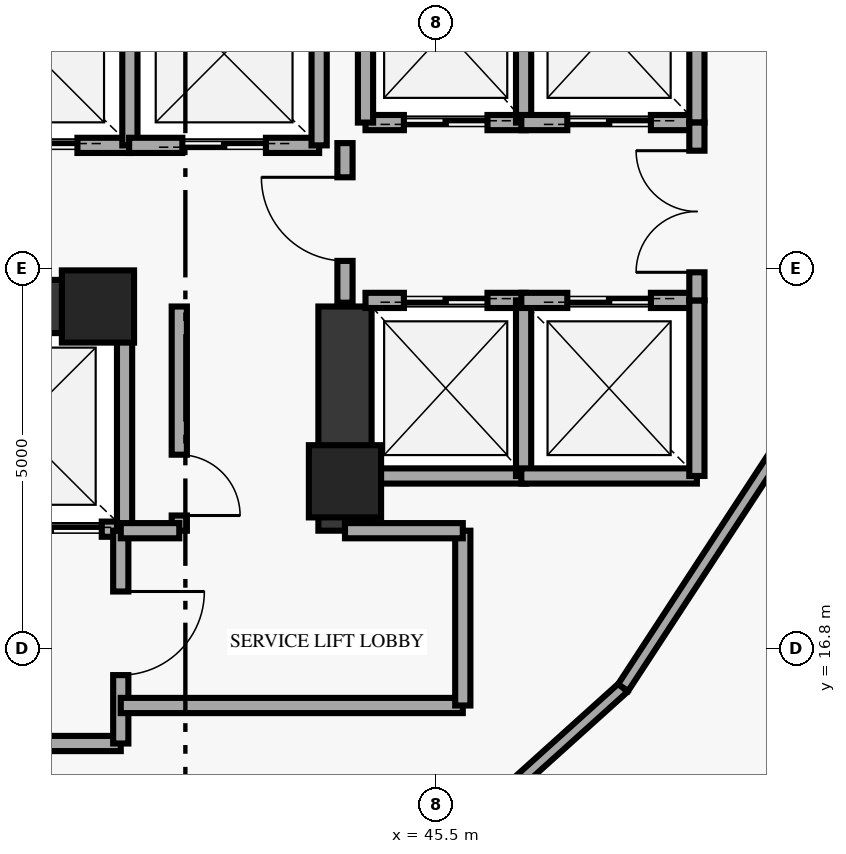
"""IFC4 building model, lengths in metres.
Left out: names, types, materials, properties, quantities, classifications, styles, units other than length and angle.
Written with IfcOpenShell. Run it as: python <this file> out.ifc"""

import sys

from ifc_helpers import new_model, si_unit, direction, frame, frame_2d, origin, origin_2d, place, context, subcontext, project, spatial, rectangle, extrude, element, fill, save


model = new_model("IFC4")
c1 = context("Model", 3, precision=1e-05, world=origin(), true_north=direction((0.0, 1.0)))
c2 = subcontext(c1, "Body", "Model", "MODEL_VIEW")
j1 = project(units=[si_unit("LENGTHUNIT", "METRE"), si_unit("PLANEANGLEUNIT", "RADIAN")], contexts=[c1])
p1 = place(None, origin())
s1 = spatial("IfcSite", under=j1, at=p1, CompositionType="ELEMENT")
p2 = place(p1, origin())
s2 = spatial("IfcBuilding", under=s1, at=p2, CompositionType="ELEMENT")
p3 = place(p2, frame((0.0, 0.0, 113.25)))
s3 = spatial("IfcBuildingStorey", under=s2, at=p3, CompositionType="ELEMENT", Elevation=113.25)
for number, where, z_axis, x_axis in (
    (1, (41.05, 21.3, 0.0), (0.0, 0.0, 1.0), (1.0, 0.0, 0.0)),
    (2, (44.3, 19.0, 0.0), (0.0, 0.0, 1.0), (1.0, 0.0, 0.0)),
):
    element("IfcColumn", number, at=place(p3, frame(where, z_axis=z_axis, x_axis=x_axis)), inside=s3, PredefinedType="PILASTER", context=c2, shape_type="SweptSolid", body=[
        extrude(rectangle(XDim=0.95, YDim=0.95, at=origin_2d()), origin(), (0.0, 0.0, 1.0), 4.75),
    ])
p4 = place(p3, frame((44.3, 18.35, 0.0), z_axis=(0.0, 0.0, 1.0), x_axis=(0.0, 1.0, 0.0)))
e3 = element("IfcWall", 3, at=p4, inside=s3, PredefinedType="SHEAR", context=c2, shape_type="SweptSolid", body=[
    extrude(rectangle(XDim=2.95, YDim=0.7, at=frame_2d((1.475, 0.0))), origin(), (0.0, 0.0, 1.0), 4.75),
])
p5 = place(p3, frame((33.7, 21.3, 0.0), z_axis=(0.0, 0.0, 1.0), x_axis=(1.0, 0.0, 0.0)))
e4 = element("IfcWall", 4, at=p5, inside=s3, PredefinedType="SHEAR", context=c2, shape_type="SweptSolid", body=[
    extrude(rectangle(XDim=7.55, YDim=0.7, at=frame_2d((3.775, 0.0))), origin(), (0.0, 0.0, 1.0), 4.75),
])
p6 = place(p3, frame((44.57, 23.72, 0.0), z_axis=(0.0, 0.0, 1.0), x_axis=(1.0, 0.0, 0.0)))
e5 = element("IfcWall", 5, at=p6, inside=s3, PredefinedType="SOLIDWALL", context=c2, shape_type="SweptSolid", body=[
    extrude(rectangle(XDim=2.11, YDim=0.2, at=frame_2d((1.055, 0.0))), origin(), (0.0, 0.0, 1.0), 4.75),
])
p7 = place(p6, frame((0.505, 0.0, 0.0)))
e6 = element("IfcOpeningElement", 6, at=p7, cuts=e5, PredefinedType="OPENING", context=c2, shape_type="SweptSolid", body=[
    extrude(rectangle(XDim=1.1, YDim=2.15, at=frame_2d((0.55, 1.075))), frame((0.0, 0.11, 0.0), z_axis=(0.0, -1.0, 0.0), x_axis=(1.0, 0.0, 0.0)), (0.0, 0.0, 1.0), 0.22),
])
for number, where, z_axis, x_axis in (
    (7, (44.57, 23.72, 0.0), (0.0, 0.0, 1.0), (0.0, 1.0, 0.0)),
    (8, (46.65, 23.72, 0.0), (0.0, 0.0, 1.0), (0.0, 1.0, 0.0)),
):
    element("IfcWall", number, at=place(p3, frame(where, z_axis=z_axis, x_axis=x_axis)), inside=s3, PredefinedType="SOLIDWALL", context=c2, shape_type="SweptSolid", body=[
        extrude(rectangle(XDim=2.41, YDim=0.2, at=frame_2d((1.205, 0.0))), origin(), (0.0, 0.0, 1.0), 4.75),
    ])
p8 = place(p3, frame((46.62, 23.72, 0.0), z_axis=(0.0, 0.0, 1.0), x_axis=(1.0, 0.0, 0.0)))
e9 = element("IfcWall", 9, at=p8, inside=s3, PredefinedType="SOLIDWALL", context=c2, shape_type="SweptSolid", body=[
    extrude(rectangle(XDim=2.31, YDim=0.2, at=frame_2d((1.155, 0.0))), origin(), (0.0, 0.0, 1.0), 4.75),
])
p9 = place(p8, frame((0.605, 0.0, 0.0)))
e10 = element("IfcOpeningElement", 10, at=p9, cuts=e9, PredefinedType="OPENING", context=c2, shape_type="SweptSolid", body=[
    extrude(rectangle(XDim=1.1, YDim=2.15, at=frame_2d((0.55, 1.075))), frame((0.0, 0.11, 0.0), z_axis=(0.0, -1.0, 0.0), x_axis=(1.0, 0.0, 0.0)), (0.0, 0.0, 1.0), 0.22),
])
p10 = place(p3, frame((48.93, 23.72, 0.0), z_axis=(0.0, 0.0, 1.0), x_axis=(0.0, 1.0, 0.0)))
e11 = element("IfcWall", 11, at=p10, inside=s3, PredefinedType="SOLIDWALL", context=c2, shape_type="SweptSolid", body=[
    extrude(rectangle(XDim=2.41, YDim=0.2, at=frame_2d((1.205, 0.0))), origin(), (0.0, 0.0, 1.0), 4.75),
])
p11 = place(p3, frame((44.57, 19.07, 0.0), z_axis=(0.0, 0.0, 1.0), x_axis=(1.0, 0.0, 0.0)))
e12 = element("IfcWall", 12, at=p11, inside=s3, PredefinedType="SOLIDWALL", context=c2, shape_type="SweptSolid", body=[
    extrude(rectangle(XDim=2.11, YDim=0.2, at=frame_2d((1.055, 0.0))), origin(), (0.0, 0.0, 1.0), 4.75),
])
p12 = place(p3, frame((44.57, 21.38, 0.0), z_axis=(0.0, 0.0, 1.0), x_axis=(1.0, 0.0, 0.0)))
e13 = element("IfcWall", 13, at=p12, inside=s3, PredefinedType="SOLIDWALL", context=c2, shape_type="SweptSolid", body=[
    extrude(rectangle(XDim=2.11, YDim=0.2, at=frame_2d((1.055, 0.0))), origin(), (0.0, 0.0, 1.0), 4.75),
])
p13 = place(p12, frame((0.505, 0.0, 0.0)))
e14 = element("IfcOpeningElement", 14, at=p13, cuts=e13, PredefinedType="OPENING", context=c2, shape_type="SweptSolid", body=[
    extrude(rectangle(XDim=1.1, YDim=2.15, at=frame_2d((0.55, 1.075))), frame((0.0, 0.11, 0.0), z_axis=(0.0, -1.0, 0.0), x_axis=(1.0, 0.0, 0.0)), (0.0, 0.0, 1.0), 0.22),
])
for number, where, z_axis, x_axis in (
    (15, (46.65, 19.07, 0.0), (0.0, 0.0, 1.0), (0.0, 1.0, 0.0)),
    (16, (46.62, 19.07, 0.0), (0.0, 0.0, 1.0), (1.0, 0.0, 0.0)),
):
    element("IfcWall", number, at=place(p3, frame(where, z_axis=z_axis, x_axis=x_axis)), inside=s3, PredefinedType="SOLIDWALL", context=c2, shape_type="SweptSolid", body=[
        extrude(rectangle(XDim=2.31, YDim=0.2, at=frame_2d((1.155, 0.0))), origin(), (0.0, 0.0, 1.0), 4.75),
    ])
p14 = place(p3, frame((46.62, 21.38, 0.0), z_axis=(0.0, 0.0, 1.0), x_axis=(1.0, 0.0, 0.0)))
e17 = element("IfcWall", 17, at=p14, inside=s3, PredefinedType="SOLIDWALL", context=c2, shape_type="SweptSolid", body=[
    extrude(rectangle(XDim=2.31, YDim=0.2, at=frame_2d((1.155, 0.0))), origin(), (0.0, 0.0, 1.0), 4.75),
])
p15 = place(p14, frame((0.605, 0.0, 0.0)))
e18 = element("IfcOpeningElement", 18, at=p15, cuts=e17, PredefinedType="OPENING", context=c2, shape_type="SweptSolid", body=[
    extrude(rectangle(XDim=1.1, YDim=2.15, at=frame_2d((0.55, 1.075))), frame((0.0, 0.11, 0.0), z_axis=(0.0, -1.0, 0.0), x_axis=(1.0, 0.0, 0.0)), (0.0, 0.0, 1.0), 0.22),
])
p16 = place(p3, frame((48.93, 19.07, 0.0), z_axis=(0.0, 0.0, 1.0), x_axis=(0.0, 1.0, 0.0)))
e19 = element("IfcWall", 19, at=p16, inside=s3, PredefinedType="SOLIDWALL", context=c2, shape_type="SweptSolid", body=[
    extrude(rectangle(XDim=2.31, YDim=0.2, at=frame_2d((1.155, 0.0))), origin(), (0.0, 0.0, 1.0), 4.75),
])
p17 = place(p3, frame((38.98, 23.42, 0.0), z_axis=(0.0, 0.0, 1.0), x_axis=(1.0, 0.0, 0.0)))
e20 = element("IfcWall", 20, at=p17, inside=s3, PredefinedType="SOLIDWALL", context=c2, shape_type="SweptSolid", body=[
    extrude(rectangle(XDim=2.5, YDim=0.2, at=frame_2d((1.25, 0.0))), origin(), (0.0, 0.0, 1.0), 4.75),
])
p18 = place(p17, frame((0.7, 0.0, 0.0)))
e21 = element("IfcOpeningElement", 21, at=p18, cuts=e20, PredefinedType="OPENING", context=c2, shape_type="SweptSolid", body=[
    extrude(rectangle(XDim=1.1, YDim=2.15, at=frame_2d((0.55, 1.075))), frame((0.0, 0.11, 0.0), z_axis=(0.0, -1.0, 0.0), x_axis=(1.0, 0.0, 0.0)), (0.0, 0.0, 1.0), 0.22),
])
p19 = place(p3, frame((41.47, 23.42, 0.0), z_axis=(0.0, 0.0, 1.0), x_axis=(0.0, 1.0, 0.0)))
e22 = element("IfcWall", 22, at=p19, inside=s3, PredefinedType="SOLIDWALL", context=c2, shape_type="SweptSolid", body=[
    extrude(rectangle(XDim=2.41, YDim=0.2, at=frame_2d((1.205, 0.0))), origin(), (0.0, 0.0, 1.0), 4.75),
])
p20 = place(p3, frame((41.46, 23.42, 0.0), z_axis=(0.0, 0.0, 1.0), x_axis=(1.0, 0.0, 0.0)))
e23 = element("IfcWall", 23, at=p20, inside=s3, PredefinedType="SOLIDWALL", context=c2, shape_type="SweptSolid", body=[
    extrude(rectangle(XDim=2.5, YDim=0.2, at=frame_2d((1.25, 0.0))), origin(), (0.0, 0.0, 1.0), 4.75),
])
p21 = place(p20, frame((0.7, 0.0, 0.0)))
e24 = element("IfcOpeningElement", 24, at=p21, cuts=e23, PredefinedType="OPENING", context=c2, shape_type="SweptSolid", body=[
    extrude(rectangle(XDim=1.1, YDim=2.15, at=frame_2d((0.55, 1.075))), frame((0.0, 0.11, 0.0), z_axis=(0.0, -1.0, 0.0), x_axis=(1.0, 0.0, 0.0)), (0.0, 0.0, 1.0), 0.22),
])
p22 = place(p3, frame((43.96, 23.42, 0.0), z_axis=(0.0, 0.0, 1.0), x_axis=(0.0, 1.0, 0.0)))
e25 = element("IfcWall", 25, at=p22, inside=s3, PredefinedType="SOLIDWALL", context=c2, shape_type="SweptSolid", body=[
    extrude(rectangle(XDim=2.41, YDim=0.2, at=frame_2d((1.205, 0.0))), origin(), (0.0, 0.0, 1.0), 4.75),
])
p23 = place(p3, frame((38.57, 18.37, 0.0), z_axis=(0.0, 0.0, 1.0), x_axis=(1.0, 0.0, 0.0)))
e26 = element("IfcWall", 26, at=p23, inside=s3, PredefinedType="SOLIDWALL", context=c2, shape_type="SweptSolid", body=[
    extrude(rectangle(XDim=2.83, YDim=0.2, at=frame_2d((1.415, 0.0))), origin(), (0.0, 0.0, 1.0), 4.75),
])
p24 = place(p23, frame((1.18, 0.0, 0.0)))
e27 = element("IfcOpeningElement", 27, at=p24, cuts=e26, PredefinedType="OPENING", context=c2, shape_type="SweptSolid", body=[
    extrude(rectangle(XDim=1.35, YDim=2.18, at=frame_2d((0.675, 1.09))), frame((0.0, 0.11, 0.0), z_axis=(0.0, -1.0, 0.0), x_axis=(1.0, 0.0, 0.0)), (0.0, 0.0, 1.0), 0.22),
])
p25 = place(p3, frame((41.4, 18.37, 0.0), z_axis=(0.0, 0.0, 1.0), x_axis=(0.0, 1.0, 0.0)))
e28 = element("IfcWall", 28, at=p25, inside=s3, PredefinedType="SOLIDWALL", context=c2, shape_type="SweptSolid", body=[
    extrude(rectangle(XDim=2.71, YDim=0.2, at=frame_2d((1.355, 0.0))), origin(), (0.0, 0.0, 1.0), 4.75),
])
p26 = place(p3, frame((48.93, 21.38, 0.0), z_axis=(0.0, 0.0, 1.0), x_axis=(0.0, 1.0, 0.0)))
e29 = element("IfcWall", 29, at=p26, inside=s3, PredefinedType="SOLIDWALL", context=c2, shape_type="SweptSolid", body=[
    extrude(rectangle(XDim=2.34, YDim=0.2, at=frame_2d((1.17, 0.0))), origin(), (0.0, 0.0, 1.0), 4.75),
])
p27 = place(p26, frame((0.37, 0.0, 0.0)))
e30 = element("IfcOpeningElement", 30, at=p27, cuts=e29, PredefinedType="OPENING", context=c2, shape_type="SweptSolid", body=[
    extrude(rectangle(XDim=1.6, YDim=2.2, at=frame_2d((0.8, 1.1))), frame((0.0, 0.11, 0.0), z_axis=(0.0, -1.0, 0.0), x_axis=(1.0, 0.0, 0.0)), (0.0, 0.0, 1.0), 0.22),
])
p28 = place(p3, frame((44.3, 21.35, 0.0), z_axis=(0.0, 0.0, 1.0), x_axis=(0.0, 1.0, 0.0)))
e31 = element("IfcWall", 31, at=p28, inside=s3, PredefinedType="SOLIDWALL", context=c2, shape_type="SweptSolid", body=[
    extrude(rectangle(XDim=2.1, YDim=0.2, at=frame_2d((1.05, 0.0))), origin(), (0.0, 0.0, 1.0), 4.135),
])
p29 = place(p28, frame((0.55, 0.0, 0.0)))
e32 = element("IfcOpeningElement", 32, at=p29, cuts=e31, PredefinedType="OPENING", context=c2, shape_type="SweptSolid", body=[
    extrude(rectangle(XDim=1.1, YDim=2.15, at=frame_2d((0.55, 1.075))), frame((0.0, 0.11, 0.0), z_axis=(0.0, -1.0, 0.0), x_axis=(1.0, 0.0, 0.0)), (0.0, 0.0, 1.0), 0.22),
])
p30 = place(p3, frame((33.8, 15.55, 0.0), z_axis=(0.0, 0.0, 1.0), x_axis=(1.0, 0.0, 0.0)))
e33 = element("IfcWall", 33, at=p30, inside=s3, PredefinedType="SOLIDWALL", context=c2, shape_type="SweptSolid", body=[
    extrude(rectangle(XDim=7.55, YDim=0.2, at=frame_2d((3.775, 0.0))), origin(), (0.0, 0.0, 1.0), 4.75),
])
p31 = place(p3, frame((41.35, 15.55, 0.0), z_axis=(0.0, 0.0, 1.0), x_axis=(0.0, 1.0, 0.0)))
e34 = element("IfcWall", 34, at=p31, inside=s3, PredefinedType="SOLIDWALL", context=c2, shape_type="SweptSolid", body=[
    extrude(rectangle(XDim=2.8, YDim=0.2, at=frame_2d((1.4, 0.0))), origin(), (0.0, 0.0, 1.0), 4.75),
])
p32 = place(p31, frame((0.9, 0.0, 0.0)))
e35 = element("IfcOpeningElement", 35, at=p32, cuts=e34, PredefinedType="OPENING", context=c2, shape_type="SweptSolid", body=[
    extrude(rectangle(XDim=1.1, YDim=2.15, at=frame_2d((0.55, 1.075))), frame((0.0, 0.11, 0.0), z_axis=(0.0, -1.0, 0.0), x_axis=(1.0, 0.0, 0.0)), (0.0, 0.0, 1.0), 0.22),
])
p33 = place(p3, frame((41.35, 16.05, 0.0), z_axis=(0.0, 0.0, 1.0), x_axis=(1.0, 0.0, 0.0)))
e36 = element("IfcWall", 36, at=p33, inside=s3, PredefinedType="SOLIDWALL", context=c2, shape_type="SweptSolid", body=[
    extrude(rectangle(XDim=4.5, YDim=0.2, at=frame_2d((2.25, 0.0))), origin(), (0.0, 0.0, 1.0), 4.75),
])
p34 = place(p3, frame((45.85, 16.05, 0.0), z_axis=(0.0, 0.0, 1.0), x_axis=(0.0, 1.0, 0.0)))
e37 = element("IfcWall", 37, at=p34, inside=s3, PredefinedType="SOLIDWALL", context=c2, shape_type="SweptSolid", body=[
    extrude(rectangle(XDim=2.3, YDim=0.2, at=frame_2d((1.15, 0.0))), origin(), (0.0, 0.0, 1.0), 4.75),
])
p35 = place(p3, frame((44.3, 18.35, 0.0), z_axis=(0.0, 0.0, 1.0), x_axis=(1.0, 0.0, 0.0)))
e38 = element("IfcWall", 38, at=p35, inside=s3, PredefinedType="SOLIDWALL", context=c2, shape_type="SweptSolid", body=[
    extrude(rectangle(XDim=1.55, YDim=0.2, at=frame_2d((0.775, 0.0))), origin(), (0.0, 0.0, 1.0), 4.75),
])
p36 = place(p3, frame((42.12, 18.35, 0.0), z_axis=(0.0, 0.0, 1.0), x_axis=(0.0, 1.0, 0.0)))
e39 = element("IfcWall", 39, at=p36, inside=s3, PredefinedType="SOLIDWALL", context=c2, shape_type="SweptSolid", body=[
    extrude(rectangle(XDim=2.95, YDim=0.2, at=frame_2d((1.475, 0.0))), origin(), (0.0, 0.0, 1.0), 4.75),
])
p37 = place(p36, frame((0.2, 0.0, 0.0)))
e40 = element("IfcOpeningElement", 40, at=p37, cuts=e39, PredefinedType="OPENING", context=c2, shape_type="SweptSolid", body=[
    extrude(rectangle(XDim=0.8, YDim=2.05, at=frame_2d((0.4, 1.025))), frame((0.0, 0.11, 0.0), z_axis=(0.0, -1.0, 0.0), x_axis=(1.0, 0.0, 0.0)), (0.0, 0.0, 1.0), 0.22),
])
p38 = place(p3, frame((41.35, 18.35, 0.0), z_axis=(0.0, 0.0, 1.0), x_axis=(1.0, 0.0, 0.0)))
e41 = element("IfcWall", 41, at=p38, inside=s3, PredefinedType="SOLIDWALL", context=c2, shape_type="SweptSolid", body=[
    extrude(rectangle(XDim=0.77, YDim=0.2, at=frame_2d((0.385, 0.0))), origin(), (0.0, 0.0, 1.0), 4.75),
])
p39 = place(p3, frame((45.335, 13.922, 0.0), z_axis=(0.0, 0.0, 1.0), x_axis=(0.743129101656, 0.66914806902, 0.0)))
e42 = element("IfcWall", 42, at=p39, inside=s3, PredefinedType="PARTITIONING", context=c2, shape_type="SweptSolid", body=[
    extrude(rectangle(XDim=3.531, YDim=0.16, at=frame_2d((1.766, 0.0))), origin(), (0.0, 0.0, 1.0), 4.75),
])
p40 = place(p3, frame((47.959, 16.285, 0.0), z_axis=(0.0, 0.0, 1.0), x_axis=(0.547252937869, 0.836967276537, 0.0)))
e43 = element("IfcWall", 43, at=p40, inside=s3, PredefinedType="PARTITIONING", context=c2, shape_type="SweptSolid", body=[
    extrude(rectangle(XDim=3.68, YDim=0.16, at=frame_2d((1.84, 0.0))), origin(), (0.0, 0.0, 1.0), 4.75),
])
p41 = place(p7, origin())
e44 = element("IfcDoor", 44, at=p41, inside=s3, OperationType="DOUBLE_DOOR_SLIDING", PredefinedType="DOOR", context=c2, shape_type="SweptSolid", body=[
    extrude(rectangle(XDim=1.1, YDim=2.15, at=frame_2d((0.55, 1.075))), frame((0.0, 0.025, 0.0), z_axis=(0.0, -1.0, 0.0), x_axis=(1.0, 0.0, 0.0)), (0.0, 0.0, 1.0), 0.05),
])
fill(e6, e44)
p42 = place(p9, origin())
e45 = element("IfcDoor", 45, at=p42, inside=s3, OperationType="DOUBLE_DOOR_SLIDING", PredefinedType="DOOR", context=c2, shape_type="SweptSolid", body=[
    extrude(rectangle(XDim=1.1, YDim=2.15, at=frame_2d((0.55, 1.075))), frame((0.0, 0.025, 0.0), z_axis=(0.0, -1.0, 0.0), x_axis=(1.0, 0.0, 0.0)), (0.0, 0.0, 1.0), 0.05),
])
fill(e10, e45)
p43 = place(p13, origin())
e46 = element("IfcDoor", 46, at=p43, inside=s3, OperationType="DOUBLE_DOOR_SLIDING", PredefinedType="DOOR", context=c2, shape_type="SweptSolid", body=[
    extrude(rectangle(XDim=1.1, YDim=2.15, at=frame_2d((0.55, 1.075))), frame((0.0, 0.025, 0.0), z_axis=(0.0, -1.0, 0.0), x_axis=(1.0, 0.0, 0.0)), (0.0, 0.0, 1.0), 0.05),
])
fill(e14, e46)
p44 = place(p15, origin())
e47 = element("IfcDoor", 47, at=p44, inside=s3, OperationType="DOUBLE_DOOR_SLIDING", PredefinedType="DOOR", context=c2, shape_type="SweptSolid", body=[
    extrude(rectangle(XDim=1.1, YDim=2.15, at=frame_2d((0.55, 1.075))), frame((0.0, 0.025, 0.0), z_axis=(0.0, -1.0, 0.0), x_axis=(1.0, 0.0, 0.0)), (0.0, 0.0, 1.0), 0.05),
])
fill(e18, e47)
p45 = place(p18, origin())
e48 = element("IfcDoor", 48, at=p45, inside=s3, OperationType="DOUBLE_DOOR_SLIDING", PredefinedType="DOOR", context=c2, shape_type="SweptSolid", body=[
    extrude(rectangle(XDim=1.1, YDim=2.15, at=frame_2d((0.55, 1.075))), frame((0.0, 0.025, 0.0), z_axis=(0.0, -1.0, 0.0), x_axis=(1.0, 0.0, 0.0)), (0.0, 0.0, 1.0), 0.05),
])
fill(e21, e48)
p46 = place(p21, origin())
e49 = element("IfcDoor", 49, at=p46, inside=s3, OperationType="DOUBLE_DOOR_SLIDING", PredefinedType="DOOR", context=c2, shape_type="SweptSolid", body=[
    extrude(rectangle(XDim=1.1, YDim=2.15, at=frame_2d((0.55, 1.075))), frame((0.0, 0.025, 0.0), z_axis=(0.0, -1.0, 0.0), x_axis=(1.0, 0.0, 0.0)), (0.0, 0.0, 1.0), 0.05),
])
fill(e24, e49)
p47 = place(p24, origin())
e50 = element("IfcDoor", 50, at=p47, inside=s3, OperationType="DOUBLE_DOOR_SLIDING", PredefinedType="DOOR", context=c2, shape_type="SweptSolid", body=[
    extrude(rectangle(XDim=1.35, YDim=2.18, at=frame_2d((0.675, 1.09))), frame((0.0, 0.025, 0.0), z_axis=(0.0, -1.0, 0.0), x_axis=(1.0, 0.0, 0.0)), (0.0, 0.0, 1.0), 0.05),
])
fill(e27, e50)
p48 = place(p27, origin())
e51 = element("IfcDoor", 51, at=p48, inside=s3, OperationType="DOUBLE_DOOR_SINGLE_SWING", PredefinedType="DOOR", context=c2, shape_type="SweptSolid", body=[
    extrude(rectangle(XDim=1.6, YDim=2.2, at=frame_2d((0.8, 1.1))), frame((0.0, 0.025, 0.0), z_axis=(0.0, -1.0, 0.0), x_axis=(1.0, 0.0, 0.0)), (0.0, 0.0, 1.0), 0.05),
])
fill(e30, e51)
p49 = place(p29, origin())
e52 = element("IfcDoor", 52, at=p49, inside=s3, OperationType="SINGLE_SWING_RIGHT", PredefinedType="DOOR", context=c2, shape_type="SweptSolid", body=[
    extrude(rectangle(XDim=1.1, YDim=2.15, at=frame_2d((0.55, 1.075))), frame((0.0, 0.025, 0.0), z_axis=(0.0, -1.0, 0.0), x_axis=(1.0, 0.0, 0.0)), (0.0, 0.0, 1.0), 0.05),
])
fill(e32, e52)
p50 = place(p32, origin())
e53 = element("IfcDoor", 53, at=p50, inside=s3, OperationType="SINGLE_SWING_RIGHT", PredefinedType="DOOR", context=c2, shape_type="SweptSolid", body=[
    extrude(rectangle(XDim=1.1, YDim=2.15, at=frame_2d((0.55, 1.075))), frame((0.0, 0.025, 0.0), z_axis=(0.0, -1.0, 0.0), x_axis=(1.0, 0.0, 0.0)), (0.0, 0.0, 1.0), 0.05),
])
fill(e35, e53)
p51 = place(p37, origin())
e54 = element("IfcDoor", 54, at=p51, inside=s3, OperationType="SINGLE_SWING_LEFT", PredefinedType="DOOR", context=c2, shape_type="SweptSolid", body=[
    extrude(rectangle(XDim=0.8, YDim=2.05, at=frame_2d((0.4, 1.025))), frame((0.0, 0.025, 0.0), z_axis=(0.0, -1.0, 0.0), x_axis=(1.0, 0.0, 0.0)), (0.0, 0.0, 1.0), 0.05),
])
fill(e40, e54)
save(model, sys.argv[1])
